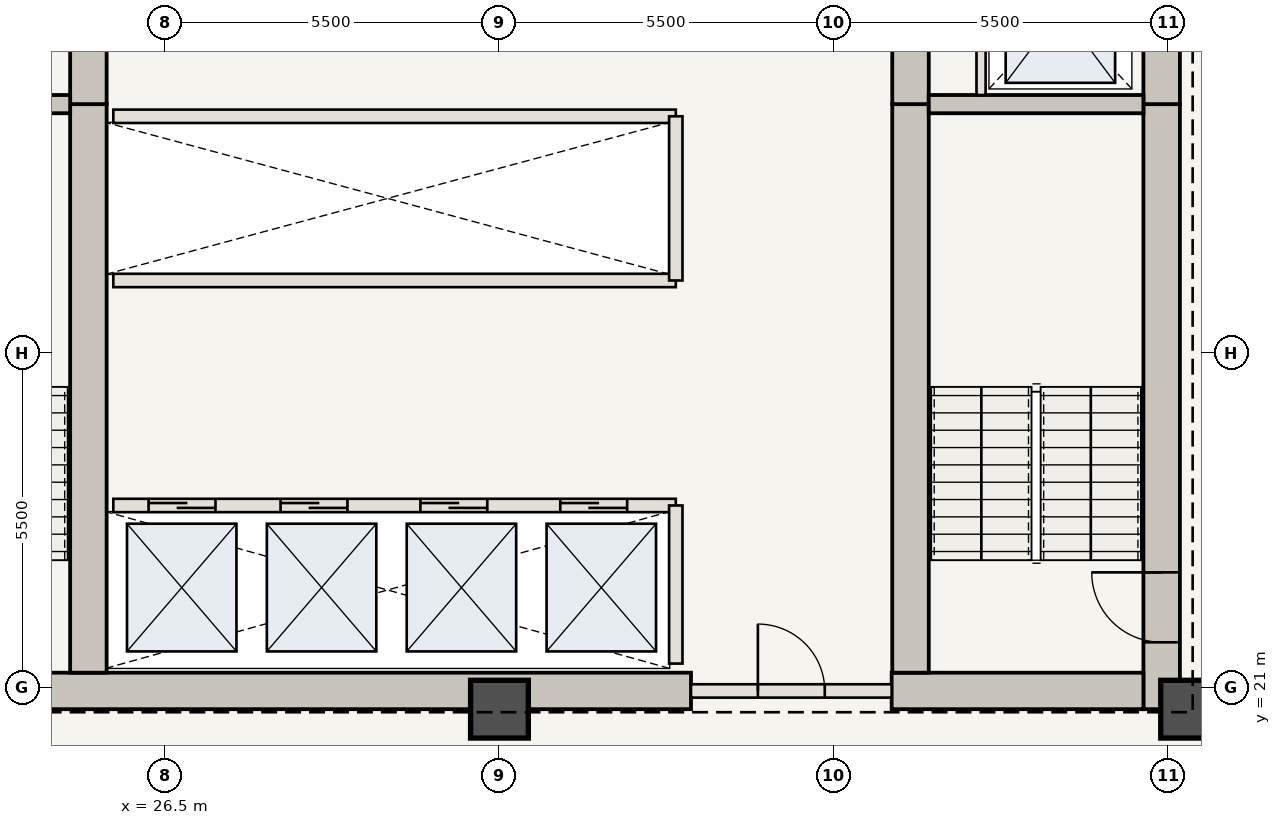
"""IFC4 building model, lengths in metres.
Left out: names, types, materials, properties, quantities, classifications, styles, units other than length and angle.
Written with IfcOpenShell. Run it as: python <this file> out.ifc"""

import sys

from ifc_helpers import new_model, si_unit, direction, frame, frame_2d, origin, origin_2d, place, context, subcontext, project, spatial, rectangle, extrude, element, fill, save


model = new_model("IFC4")
c1 = context("Model", 3, precision=1e-05, world=origin(), true_north=direction((0.0, 1.0)))
c2 = subcontext(c1, "Body", "Model", "MODEL_VIEW")
j1 = project(units=[si_unit("LENGTHUNIT", "METRE"), si_unit("PLANEANGLEUNIT", "RADIAN")], contexts=[c1])
p1 = place(None, origin())
s1 = spatial("IfcSite", under=j1, at=p1, CompositionType="ELEMENT")
p2 = place(p1, origin())
s2 = spatial("IfcBuilding", under=s1, at=p2, CompositionType="ELEMENT")
p3 = place(p2, frame((0.0, 0.0, 164.5)))
s3 = spatial("IfcBuildingStorey", under=s2, at=p3, CompositionType="ELEMENT", Elevation=164.5)
p4 = place(p3, frame((42.89, 20.65, 0.0), z_axis=(0.0, 0.0, 1.0), x_axis=(0.0, 1.0, 0.0)))
e1 = element("IfcWall", 1, at=p4, inside=s3, PredefinedType="SHEAR", context=c2, shape_type="SweptSolid", body=[
    extrude(rectangle(XDim=9.95, YDim=0.6, at=frame_2d((4.975, 0.0))), origin(), (0.0, 0.0, 1.0), 3.85),
])
p5 = place(p4, frame((1.1, 0.0, 0.0)))
e2 = element("IfcOpeningElement", 2, at=p5, cuts=e1, PredefinedType="OPENING", context=c2, shape_type="SweptSolid", body=[
    extrude(rectangle(XDim=1.15, YDim=2.15, at=frame_2d((0.575, 1.075))), frame((0.0, 0.31, 0.0), z_axis=(0.0, -1.0, 0.0), x_axis=(1.0, 0.0, 0.0)), (0.0, 0.0, 1.0), 0.62),
])
p6 = place(p3, frame((42.89, 30.6, 0.0), z_axis=(0.0, 0.0, 1.0), x_axis=(0.0, 1.0, 0.0)))
e3 = element("IfcWall", 3, at=p6, inside=s3, PredefinedType="SHEAR", context=c2, shape_type="SweptSolid", body=[
    extrude(rectangle(XDim=12.7, YDim=0.6, at=frame_2d((6.35, 0.0))), origin(), (0.0, 0.0, 1.0), 3.85),
])
p7 = place(p6, frame((4.2, 0.0, 0.0)))
e4 = element("IfcOpeningElement", 4, at=p7, cuts=e3, PredefinedType="OPENING", context=c2, shape_type="SweptSolid", body=[
    extrude(rectangle(XDim=1.1, YDim=2.15, at=frame_2d((0.55, 1.075))), frame((0.0, 0.31, 0.0), z_axis=(0.0, -1.0, 0.0), x_axis=(1.0, 0.0, 0.0)), (0.0, 0.0, 1.0), 0.62),
])
p8 = place(p6, frame((9.2, 0.0, 0.0)))
e5 = element("IfcOpeningElement", 5, at=p8, cuts=e3, PredefinedType="OPENING", context=c2, shape_type="SweptSolid", body=[
    extrude(rectangle(XDim=0.92, YDim=2.1, at=frame_2d((0.46, 1.05))), frame((0.0, 0.31, 0.0), z_axis=(0.0, -1.0, 0.0), x_axis=(1.0, 0.0, 0.0)), (0.0, 0.0, 1.0), 0.62),
])
p9 = place(p3, frame((21.41, 20.95, 0.0), z_axis=(0.0, 0.0, 1.0), x_axis=(1.0, 0.0, 0.0)))
e6 = element("IfcWall", 6, at=p9, inside=s3, PredefinedType="SHEAR", context=c2, shape_type="SweptSolid", body=[
    extrude(rectangle(XDim=13.74, YDim=0.6, at=frame_2d((6.87, 0.0))), origin(), (0.0, 0.0, 1.0), 3.85),
])
p10 = place(p3, frame((38.45, 20.95, 0.0), z_axis=(0.0, 0.0, 1.0), x_axis=(1.0, 0.0, 0.0)))
e7 = element("IfcWall", 7, at=p10, inside=s3, PredefinedType="SHEAR", context=c2, shape_type="SweptSolid", body=[
    extrude(rectangle(XDim=4.14, YDim=0.6, at=frame_2d((2.07, 0.0))), origin(), (0.0, 0.0, 1.0), 3.85),
])
p11 = place(p3, frame((25.24, 21.25, 0.0), z_axis=(0.0, 0.0, 1.0), x_axis=(0.0, 1.0, 0.0)))
e8 = element("IfcWall", 8, at=p11, inside=s3, PredefinedType="SHEAR", context=c2, shape_type="SweptSolid", body=[
    extrude(rectangle(XDim=9.35, YDim=0.6, at=frame_2d((4.675, 0.0))), origin(), (0.0, 0.0, 1.0), 3.85),
])
p12 = place(p3, frame((25.24, 30.6, 0.0), z_axis=(0.0, 0.0, 1.0), x_axis=(0.0, 1.0, 0.0)))
e9 = element("IfcWall", 9, at=p12, inside=s3, PredefinedType="SHEAR", context=c2, shape_type="SweptSolid", body=[
    extrude(rectangle(XDim=12.1, YDim=0.6, at=frame_2d((6.05, 0.0))), origin(), (0.0, 0.0, 1.0), 3.85),
])
p13 = place(p12, frame((6.25, 0.0, 0.0)))
e10 = element("IfcOpeningElement", 10, at=p13, cuts=e9, PredefinedType="OPENING", context=c2, shape_type="SweptSolid", body=[
    extrude(rectangle(XDim=1.1, YDim=2.15, at=frame_2d((0.55, 1.075))), frame((0.0, 0.31, 0.0), z_axis=(0.0, -1.0, 0.0), x_axis=(1.0, 0.0, 0.0)), (0.0, 0.0, 1.0), 0.62),
])
p14 = place(p3, frame((38.76, 21.25, 0.0), z_axis=(0.0, 0.0, 1.0), x_axis=(0.0, 1.0, 0.0)))
e11 = element("IfcWall", 11, at=p14, inside=s3, PredefinedType="SHEAR", context=c2, shape_type="SweptSolid", body=[
    extrude(rectangle(XDim=9.35, YDim=0.6, at=frame_2d((4.675, 0.0))), origin(), (0.0, 0.0, 1.0), 3.85),
])
p15 = place(p3, frame((38.76, 30.6, 0.0), z_axis=(0.0, 0.0, 1.0), x_axis=(0.0, 1.0, 0.0)))
e12 = element("IfcWall", 12, at=p15, inside=s3, PredefinedType="SHEAR", context=c2, shape_type="SweptSolid", body=[
    extrude(rectangle(XDim=12.1, YDim=0.6, at=frame_2d((6.05, 0.0))), origin(), (0.0, 0.0, 1.0), 3.85),
])
for number, where, z_axis, x_axis in (
    (13, (32.0, 20.65, 0.0), (0.0, 0.0, 1.0), (1.0, 0.0, 0.0)),
    (14, (43.35, 20.65, 0.0), (0.0, 0.0, 1.0), (1.0, 0.0, 0.0)),
):
    element("IfcColumn", number, at=place(p3, frame(where, z_axis=z_axis, x_axis=x_axis)), inside=s3, PredefinedType="COLUMN", context=c2, shape_type="SweptSolid", body=[
        extrude(rectangle(XDim=0.95, YDim=0.95, at=origin_2d()), origin(), (0.0, 0.0, 1.0), 3.85),
    ])
for number, where, z_axis, x_axis in (
    (15, (21.41, 30.6, 0.0), (0.0, 0.0, 1.0), (1.0, 0.0, 0.0)),
    (16, (39.06, 30.6, 0.0), (0.0, 0.0, 1.0), (1.0, 0.0, 0.0)),
):
    element("IfcWall", number, at=place(p3, frame(where, z_axis=z_axis, x_axis=x_axis)), inside=s3, PredefinedType="SHEAR", context=c2, shape_type="SweptSolid", body=[
        extrude(rectangle(XDim=3.53, YDim=0.3, at=frame_2d((1.765, 0.0))), origin(), (0.0, 0.0, 1.0), 3.685),
    ])
p16 = place(p3, frame((39.92, 30.75, 0.0), z_axis=(0.0, 0.0, 1.0), x_axis=(0.0, 1.0, 0.0)))
e17 = element("IfcWall", 17, at=p16, inside=s3, PredefinedType="STANDARD", context=c2, shape_type="SweptSolid", body=[
    extrude(rectangle(XDim=2.65, YDim=0.15, at=frame_2d((1.325, 0.0))), origin(), (0.0, 0.0, 1.0), 3.685),
])
p17 = place(p3, frame((35.15, 20.95, 0.0), z_axis=(0.0, 0.0, 1.0), x_axis=(1.0, 0.0, 0.0)))
e18 = element("IfcWall", 18, at=p17, inside=s3, PredefinedType="STANDARD", context=c2, shape_type="SweptSolid", body=[
    extrude(rectangle(XDim=3.3, YDim=0.22, at=frame_2d((1.65, 0.0))), origin(), (0.0, 0.0, 1.0), 3.685),
])
p18 = place(p17, frame((1.1, 0.0, 0.0)))
e19 = element("IfcOpeningElement", 19, at=p18, cuts=e18, PredefinedType="OPENING", context=c2, shape_type="SweptSolid", body=[
    extrude(rectangle(XDim=1.1, YDim=2.15, at=frame_2d((0.55, 1.075))), frame((0.0, 0.12, 0.0), z_axis=(0.0, -1.0, 0.0), x_axis=(1.0, 0.0, 0.0)), (0.0, 0.0, 1.0), 0.24),
])
p19 = place(p3, frame((25.65, 24.0, 0.0), z_axis=(0.0, 0.0, 1.0), x_axis=(1.0, 0.0, 0.0)))
e20 = element("IfcWall", 20, at=p19, inside=s3, PredefinedType="STANDARD", context=c2, shape_type="SweptSolid", body=[
    extrude(rectangle(XDim=9.25, YDim=0.22, at=frame_2d((4.625, 0.0))), origin(), (0.0, 0.0, 1.0), 3.685),
])
p20 = place(p19, frame((0.58, 0.0, 0.0)))
e21 = element("IfcOpeningElement", 21, at=p20, cuts=e20, PredefinedType="OPENING", context=c2, shape_type="SweptSolid", body=[
    extrude(rectangle(XDim=1.1, YDim=2.15, at=frame_2d((0.55, 1.075))), frame((0.0, 0.12, 0.0), z_axis=(0.0, -1.0, 0.0), x_axis=(1.0, 0.0, 0.0)), (0.0, 0.0, 1.0), 0.24),
])
p21 = place(p19, frame((2.75, 0.0, 0.0)))
e22 = element("IfcOpeningElement", 22, at=p21, cuts=e20, PredefinedType="OPENING", context=c2, shape_type="SweptSolid", body=[
    extrude(rectangle(XDim=1.1, YDim=2.15, at=frame_2d((0.55, 1.075))), frame((0.0, 0.12, 0.0), z_axis=(0.0, -1.0, 0.0), x_axis=(1.0, 0.0, 0.0)), (0.0, 0.0, 1.0), 0.24),
])
p22 = place(p19, frame((5.05, 0.0, 0.0)))
e23 = element("IfcOpeningElement", 23, at=p22, cuts=e20, PredefinedType="OPENING", context=c2, shape_type="SweptSolid", body=[
    extrude(rectangle(XDim=1.1, YDim=2.15, at=frame_2d((0.55, 1.075))), frame((0.0, 0.12, 0.0), z_axis=(0.0, -1.0, 0.0), x_axis=(1.0, 0.0, 0.0)), (0.0, 0.0, 1.0), 0.24),
])
p23 = place(p19, frame((7.35, 0.0, 0.0)))
e24 = element("IfcOpeningElement", 24, at=p23, cuts=e20, PredefinedType="OPENING", context=c2, shape_type="SweptSolid", body=[
    extrude(rectangle(XDim=1.1, YDim=2.15, at=frame_2d((0.55, 1.075))), frame((0.0, 0.12, 0.0), z_axis=(0.0, -1.0, 0.0), x_axis=(1.0, 0.0, 0.0)), (0.0, 0.0, 1.0), 0.24),
])
p24 = place(p3, frame((34.9, 21.4, 0.0), z_axis=(0.0, 0.0, 1.0), x_axis=(0.0, 1.0, 0.0)))
e25 = element("IfcWall", 25, at=p24, inside=s3, PredefinedType="STANDARD", context=c2, shape_type="SweptSolid", body=[
    extrude(rectangle(XDim=2.6, YDim=0.22, at=frame_2d((1.3, 0.0))), origin(), (0.0, 0.0, 1.0), 3.685),
])
for number, where, z_axis, x_axis in (
    (26, (25.65, 27.7, 0.0), (0.0, 0.0, 1.0), (1.0, 0.0, 0.0)),
    (27, (25.65, 30.4, 0.0), (0.0, 0.0, 1.0), (1.0, 0.0, 0.0)),
):
    element("IfcWall", number, at=place(p3, frame(where, z_axis=z_axis, x_axis=x_axis)), inside=s3, PredefinedType="STANDARD", context=c2, shape_type="SweptSolid", body=[
        extrude(rectangle(XDim=9.25, YDim=0.22, at=frame_2d((4.625, 0.0))), origin(), (0.0, 0.0, 1.0), 3.685),
    ])
p25 = place(p3, frame((34.9, 27.7, 0.0), z_axis=(0.0, 0.0, 1.0), x_axis=(0.0, 1.0, 0.0)))
e28 = element("IfcWall", 28, at=p25, inside=s3, PredefinedType="STANDARD", context=c2, shape_type="SweptSolid", body=[
    extrude(rectangle(XDim=2.7, YDim=0.22, at=frame_2d((1.35, 0.0))), origin(), (0.0, 0.0, 1.0), 3.685),
])
p26 = place(p5, origin())
e29 = element("IfcDoor", 29, at=p26, inside=s3, OperationType="SINGLE_SWING_RIGHT", PredefinedType="DOOR", context=c2, shape_type="SweptSolid", body=[
    extrude(rectangle(XDim=1.15, YDim=2.15, at=frame_2d((0.575, 1.075))), frame((0.0, 0.025, 0.0), z_axis=(0.0, -1.0, 0.0), x_axis=(1.0, 0.0, 0.0)), (0.0, 0.0, 1.0), 0.05),
])
fill(e2, e29)
p27 = place(p18, origin())
e30 = element("IfcDoor", 30, at=p27, inside=s3, OperationType="SINGLE_SWING_LEFT", PredefinedType="DOOR", context=c2, shape_type="SweptSolid", body=[
    extrude(rectangle(XDim=1.1, YDim=2.15, at=frame_2d((0.55, 1.075))), frame((0.0, 0.025, 0.0), z_axis=(0.0, -1.0, 0.0), x_axis=(1.0, 0.0, 0.0)), (0.0, 0.0, 1.0), 0.05),
])
fill(e19, e30)
p28 = place(p20, origin())
e31 = element("IfcDoor", 31, at=p28, inside=s3, OperationType="DOUBLE_DOOR_SLIDING", PredefinedType="DOOR", context=c2, shape_type="SweptSolid", body=[
    extrude(rectangle(XDim=1.1, YDim=2.15, at=frame_2d((0.55, 1.075))), frame((0.0, 0.025, 0.0), z_axis=(0.0, -1.0, 0.0), x_axis=(1.0, 0.0, 0.0)), (0.0, 0.0, 1.0), 0.05),
])
fill(e21, e31)
p29 = place(p21, origin())
e32 = element("IfcDoor", 32, at=p29, inside=s3, OperationType="DOUBLE_DOOR_SLIDING", PredefinedType="DOOR", context=c2, shape_type="SweptSolid", body=[
    extrude(rectangle(XDim=1.1, YDim=2.15, at=frame_2d((0.55, 1.075))), frame((0.0, 0.025, 0.0), z_axis=(0.0, -1.0, 0.0), x_axis=(1.0, 0.0, 0.0)), (0.0, 0.0, 1.0), 0.05),
])
fill(e22, e32)
p30 = place(p22, origin())
e33 = element("IfcDoor", 33, at=p30, inside=s3, OperationType="DOUBLE_DOOR_SLIDING", PredefinedType="DOOR", context=c2, shape_type="SweptSolid", body=[
    extrude(rectangle(XDim=1.1, YDim=2.15, at=frame_2d((0.55, 1.075))), frame((0.0, 0.025, 0.0), z_axis=(0.0, -1.0, 0.0), x_axis=(1.0, 0.0, 0.0)), (0.0, 0.0, 1.0), 0.05),
])
fill(e23, e33)
p31 = place(p23, origin())
e34 = element("IfcDoor", 34, at=p31, inside=s3, OperationType="DOUBLE_DOOR_SLIDING", PredefinedType="DOOR", context=c2, shape_type="SweptSolid", body=[
    extrude(rectangle(XDim=1.1, YDim=2.15, at=frame_2d((0.55, 1.075))), frame((0.0, 0.025, 0.0), z_axis=(0.0, -1.0, 0.0), x_axis=(1.0, 0.0, 0.0)), (0.0, 0.0, 1.0), 0.05),
])
fill(e24, e34)
save(model, sys.argv[1])
